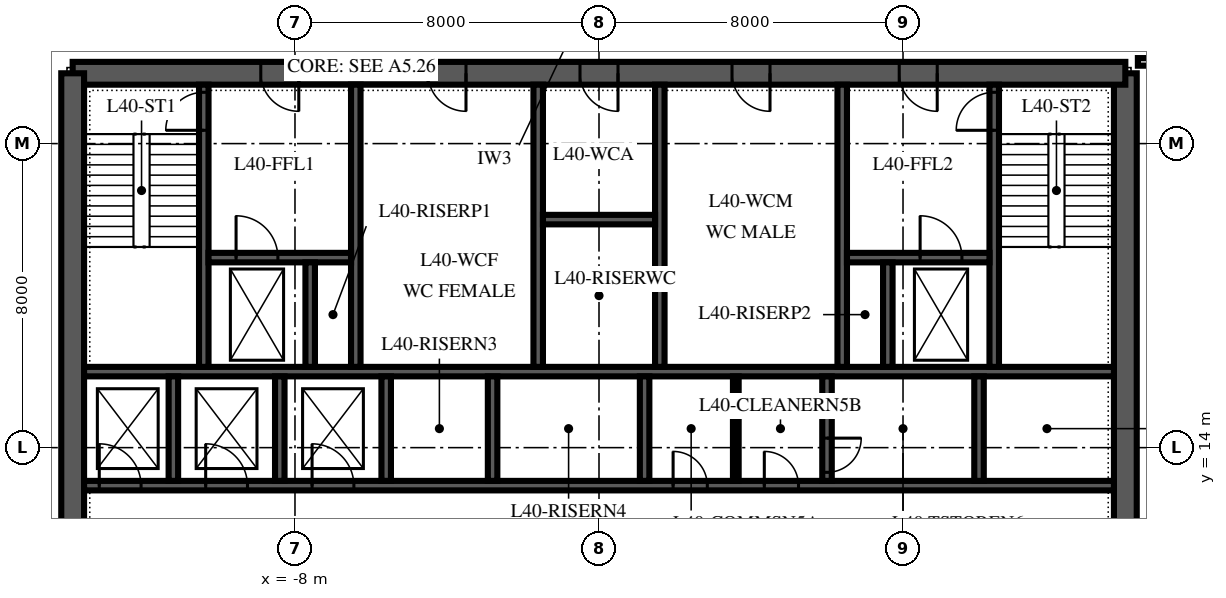
"""IFC4 building model, lengths in metres.
Left out: names, types, materials, properties, quantities, classifications, styles, units other than length and angle.
Written with IfcOpenShell. Run it as: python <this file> out.ifc"""

import sys

from ifc_helpers import new_model, si_unit, direction, frame, frame_2d, origin, place, context, subcontext, project, spatial, polyline, rectangle, outline, extrude, element, fill, save


model = new_model("IFC4")
c1 = context("Model", 3, precision=1e-05, world=origin(), true_north=direction((0.0, 1.0)))
c2 = subcontext(c1, "Body", "Model", "MODEL_VIEW")
j1 = project(units=[si_unit("LENGTHUNIT", "METRE"), si_unit("PLANEANGLEUNIT", "RADIAN")], contexts=[c1])
p1 = place(None, origin())
s1 = spatial("IfcSite", under=j1, at=p1, CompositionType="ELEMENT")
p2 = place(p1, origin())
s2 = spatial("IfcBuilding", under=s1, at=p2, CompositionType="ELEMENT")
p3 = place(p2, frame((0.0, 0.0, 178.0)))
s3 = spatial("IfcBuildingStorey", under=s2, at=p3, CompositionType="ELEMENT", Elevation=178.0)
p4 = place(p3, frame((13.85, 6.15, 0.0), z_axis=(0.0, 0.0, 1.0), x_axis=(0.0, 1.0, 0.0)))
e1 = element("IfcWall", 1, at=p4, inside=s3, PredefinedType="SHEAR", context=c2, shape_type="SweptSolid", body=[
    extrude(outline(polyline([(0.0, -0.3), (17.7, -0.3), (17.7, 0.0), (17.4, 0.0), (17.4, 0.3), (0.3, 0.3), (0.3, 0.0), (0.0, 0.0), (0.0, -0.3)])), origin(), (0.0, 0.0, 1.0), 4.0),
])
p5 = place(p4, frame((4.15, 0.0, 0.0)))
e2 = element("IfcOpeningElement", 2, at=p5, cuts=e1, PredefinedType="OPENING", context=c2, shape_type="SweptSolid", body=[
    extrude(rectangle(XDim=1.8, YDim=2.4, at=frame_2d((0.9, 1.2))), frame((0.0, 0.315, 0.0), z_axis=(0.0, -1.0, 0.0), x_axis=(1.0, 0.0, 0.0)), (0.0, 0.0, 1.0), 0.63),
])
p6 = place(p3, frame((13.85, 23.85, 0.0), z_axis=(0.0, 0.0, 1.0), x_axis=(-1.0, 0.0, 0.0)))
e3 = element("IfcWall", 3, at=p6, inside=s3, PredefinedType="SHEAR", context=c2, shape_type="SweptSolid", body=[
    extrude(rectangle(XDim=27.7, YDim=0.6, at=frame_2d((13.85, 0.0))), origin(), (0.0, 0.0, 1.0), 4.0),
])
p7 = place(p6, frame((21.75, 0.0, 0.0)))
e4 = element("IfcOpeningElement", 4, at=p7, cuts=e3, PredefinedType="OPENING", context=c2, shape_type="SweptSolid", body=[
    extrude(rectangle(XDim=1.0, YDim=2.1, at=frame_2d((0.5, 1.05))), frame((0.0, 0.315, 0.0), z_axis=(0.0, -1.0, 0.0), x_axis=(1.0, 0.0, 0.0)), (0.0, 0.0, 1.0), 0.63),
])
p8 = place(p6, frame((4.95, 0.0, 0.0)))
e5 = element("IfcOpeningElement", 5, at=p8, cuts=e3, PredefinedType="OPENING", context=c2, shape_type="SweptSolid", body=[
    extrude(rectangle(XDim=1.0, YDim=2.1, at=frame_2d((0.5, 1.05))), frame((0.0, 0.315, 0.0), z_axis=(0.0, -1.0, 0.0), x_axis=(1.0, 0.0, 0.0)), (0.0, 0.0, 1.0), 0.63),
])
p9 = place(p6, frame((17.35, 0.0, 0.0)))
e6 = element("IfcOpeningElement", 6, at=p9, cuts=e3, PredefinedType="OPENING", context=c2, shape_type="SweptSolid", body=[
    extrude(rectangle(XDim=1.0, YDim=2.1, at=frame_2d((0.5, 1.05))), frame((0.0, 0.315, 0.0), z_axis=(0.0, -1.0, 0.0), x_axis=(1.0, 0.0, 0.0)), (0.0, 0.0, 1.0), 0.63),
])
p10 = place(p6, frame((13.35, 0.0, 0.0)))
e7 = element("IfcOpeningElement", 7, at=p10, cuts=e3, PredefinedType="OPENING", context=c2, shape_type="SweptSolid", body=[
    extrude(rectangle(XDim=1.0, YDim=2.1, at=frame_2d((0.5, 1.05))), frame((0.0, 0.315, 0.0), z_axis=(0.0, -1.0, 0.0), x_axis=(1.0, 0.0, 0.0)), (0.0, 0.0, 1.0), 0.63),
])
p11 = place(p6, frame((9.35, 0.0, 0.0)))
e8 = element("IfcOpeningElement", 8, at=p11, cuts=e3, PredefinedType="OPENING", context=c2, shape_type="SweptSolid", body=[
    extrude(rectangle(XDim=1.0, YDim=2.1, at=frame_2d((0.5, 1.05))), frame((0.0, 0.315, 0.0), z_axis=(0.0, -1.0, 0.0), x_axis=(1.0, 0.0, 0.0)), (0.0, 0.0, 1.0), 0.63),
])
p12 = place(p3, frame((-13.85, 23.85, 0.0), z_axis=(0.0, 0.0, 1.0), x_axis=(0.0, -1.0, 0.0)))
e9 = element("IfcWall", 9, at=p12, inside=s3, PredefinedType="SHEAR", context=c2, shape_type="SweptSolid", body=[
    extrude(outline(polyline([(0.0, -0.3), (17.7, -0.3), (17.7, 0.0), (17.4, 0.0), (17.4, 0.3), (0.3, 0.3), (0.3, 0.0), (0.0, 0.0), (0.0, -0.3)])), origin(), (0.0, 0.0, 1.0), 4.0),
])
p13 = place(p12, frame((11.75, 0.0, 0.0)))
e10 = element("IfcOpeningElement", 10, at=p13, cuts=e9, PredefinedType="OPENING", context=c2, shape_type="SweptSolid", body=[
    extrude(rectangle(XDim=1.8, YDim=2.4, at=frame_2d((0.9, 1.2))), frame((0.0, 0.315, 0.0), z_axis=(0.0, -1.0, 0.0), x_axis=(1.0, 0.0, 0.0)), (0.0, 0.0, 1.0), 0.63),
])
p14 = place(p3, frame((-13.55, 13.0, 0.0), z_axis=(0.0, 0.0, 1.0), x_axis=(1.0, 0.0, 0.0)))
e11 = element("IfcWall", 11, at=p14, inside=s3, PredefinedType="SHEAR", context=c2, shape_type="SweptSolid", body=[
    extrude(rectangle(XDim=27.1, YDim=0.25, at=frame_2d((13.55, 0.0))), origin(), (0.0, 0.0, 1.0), 4.0),
])
p15 = place(p14, frame((0.4, 0.0, 0.0)))
e12 = element("IfcOpeningElement", 12, at=p15, cuts=e11, PredefinedType="OPENING", context=c2, shape_type="SweptSolid", body=[
    extrude(rectangle(XDim=1.1, YDim=2.1, at=frame_2d((0.55, 1.05))), frame((0.0, 0.14, 0.0), z_axis=(0.0, -1.0, 0.0), x_axis=(1.0, 0.0, 0.0)), (0.0, 0.0, 1.0), 0.28),
])
p16 = place(p14, frame((3.2, 0.0, 0.0)))
e13 = element("IfcOpeningElement", 13, at=p16, cuts=e11, PredefinedType="OPENING", context=c2, shape_type="SweptSolid", body=[
    extrude(rectangle(XDim=1.1, YDim=2.1, at=frame_2d((0.55, 1.05))), frame((0.0, 0.14, 0.0), z_axis=(0.0, -1.0, 0.0), x_axis=(1.0, 0.0, 0.0)), (0.0, 0.0, 1.0), 0.28),
])
p17 = place(p14, frame((6.0, 0.0, 0.0)))
e14 = element("IfcOpeningElement", 14, at=p17, cuts=e11, PredefinedType="OPENING", context=c2, shape_type="SweptSolid", body=[
    extrude(rectangle(XDim=1.1, YDim=2.1, at=frame_2d((0.55, 1.05))), frame((0.0, 0.14, 0.0), z_axis=(0.0, -1.0, 0.0), x_axis=(1.0, 0.0, 0.0)), (0.0, 0.0, 1.0), 0.28),
])
p18 = place(p14, frame((15.5, 0.0, 0.0)))
e15 = element("IfcOpeningElement", 15, at=p18, cuts=e11, PredefinedType="OPENING", context=c2, shape_type="SweptSolid", body=[
    extrude(rectangle(XDim=0.9, YDim=2.1, at=frame_2d((0.45, 1.05))), frame((0.0, 0.14, 0.0), z_axis=(0.0, -1.0, 0.0), x_axis=(1.0, 0.0, 0.0)), (0.0, 0.0, 1.0), 0.28),
])
p19 = place(p14, frame((17.9, 0.0, 0.0)))
e16 = element("IfcOpeningElement", 16, at=p19, cuts=e11, PredefinedType="OPENING", context=c2, shape_type="SweptSolid", body=[
    extrude(rectangle(XDim=0.9, YDim=2.1, at=frame_2d((0.45, 1.05))), frame((0.0, 0.14, 0.0), z_axis=(0.0, -1.0, 0.0), x_axis=(1.0, 0.0, 0.0)), (0.0, 0.0, 1.0), 0.28),
])
p20 = place(p3, frame((-13.55, 16.0, 0.0), z_axis=(0.0, 0.0, 1.0), x_axis=(1.0, 0.0, 0.0)))
e17 = element("IfcWall", 17, at=p20, inside=s3, PredefinedType="SHEAR", context=c2, shape_type="SweptSolid", body=[
    extrude(rectangle(XDim=27.1, YDim=0.25, at=frame_2d((13.55, 0.0))), origin(), (0.0, 0.0, 1.0), 4.0),
])
for number, where, z_axis, x_axis in (
    (18, (-11.2, 13.125, 0.0), (0.0, 0.0, 1.0), (0.0, 1.0, 0.0)),
    (19, (-8.4, 13.125, 0.0), (0.0, 0.0, 1.0), (0.0, 1.0, 0.0)),
    (20, (-5.6, 13.125, 0.0), (0.0, 0.0, 1.0), (0.0, 1.0, 0.0)),
    (21, (-2.8, 13.125, 0.0), (0.0, 0.0, 1.0), (0.0, 1.0, 0.0)),
    (22, (1.2, 13.125, 0.0), (0.0, 0.0, 1.0), (0.0, 1.0, 0.0)),
):
    element("IfcWall", number, at=place(p3, frame(where, z_axis=z_axis, x_axis=x_axis)), inside=s3, PredefinedType="SHEAR", context=c2, shape_type="SweptSolid", body=[
        extrude(rectangle(XDim=2.75, YDim=0.25, at=frame_2d((1.375, 0.0))), origin(), (0.0, 0.0, 1.0), 4.0),
    ])
p21 = place(p3, frame((6.0, 13.125, 0.0), z_axis=(0.0, 0.0, 1.0), x_axis=(0.0, 1.0, 0.0)))
e23 = element("IfcWall", 23, at=p21, inside=s3, PredefinedType="SHEAR", context=c2, shape_type="SweptSolid", body=[
    extrude(rectangle(XDim=2.75, YDim=0.25, at=frame_2d((1.375, 0.0))), origin(), (0.0, 0.0, 1.0), 4.0),
])
p22 = place(p21, frame((0.225, 0.0, 0.0)))
e24 = element("IfcOpeningElement", 24, at=p22, cuts=e23, PredefinedType="OPENING", context=c2, shape_type="SweptSolid", body=[
    extrude(rectangle(XDim=0.9, YDim=2.1, at=frame_2d((0.45, 1.05))), frame((0.0, 0.14, 0.0), z_axis=(0.0, -1.0, 0.0), x_axis=(1.0, 0.0, 0.0)), (0.0, 0.0, 1.0), 0.28),
])
p23 = place(p3, frame((10.0, 13.125, 0.0), z_axis=(0.0, 0.0, 1.0), x_axis=(0.0, 1.0, 0.0)))
e25 = element("IfcWall", 25, at=p23, inside=s3, PredefinedType="SHEAR", context=c2, shape_type="SweptSolid", body=[
    extrude(rectangle(XDim=2.75, YDim=0.25, at=frame_2d((1.375, 0.0))), origin(), (0.0, 0.0, 1.0), 4.0),
])
p24 = place(p3, frame((-10.4, 16.125, 0.0), z_axis=(0.0, 0.0, 1.0), x_axis=(0.0, 1.0, 0.0)))
e26 = element("IfcWall", 26, at=p24, inside=s3, PredefinedType="SHEAR", context=c2, shape_type="SweptSolid", body=[
    extrude(rectangle(XDim=7.425, YDim=0.25, at=frame_2d((3.712, 0.0))), origin(), (0.0, 0.0, 1.0), 4.0),
])
p25 = place(p24, frame((6.225, 0.0, 0.0)))
e27 = element("IfcOpeningElement", 27, at=p25, cuts=e26, PredefinedType="OPENING", context=c2, shape_type="SweptSolid", body=[
    extrude(rectangle(XDim=1.0, YDim=2.1, at=frame_2d((0.5, 1.05))), frame((0.0, 0.14, 0.0), z_axis=(0.0, -1.0, 0.0), x_axis=(1.0, 0.0, 0.0)), (0.0, 0.0, 1.0), 0.28),
])
for number, where, z_axis, x_axis in (
    (28, (-6.4, 16.125, 0.0), (0.0, 0.0, 1.0), (0.0, 1.0, 0.0)),
    (29, (-1.6, 16.125, 0.0), (0.0, 0.0, 1.0), (0.0, 1.0, 0.0)),
    (30, (1.6, 16.125, 0.0), (0.0, 0.0, 1.0), (0.0, 1.0, 0.0)),
    (31, (6.4, 16.125, 0.0), (0.0, 0.0, 1.0), (0.0, 1.0, 0.0)),
):
    element("IfcWall", number, at=place(p3, frame(where, z_axis=z_axis, x_axis=x_axis)), inside=s3, PredefinedType="SHEAR", context=c2, shape_type="SweptSolid", body=[
        extrude(rectangle(XDim=7.425, YDim=0.25, at=frame_2d((3.712, 0.0))), origin(), (0.0, 0.0, 1.0), 4.0),
    ])
p26 = place(p3, frame((10.4, 16.125, 0.0), z_axis=(0.0, 0.0, 1.0), x_axis=(0.0, 1.0, 0.0)))
e32 = element("IfcWall", 32, at=p26, inside=s3, PredefinedType="SHEAR", context=c2, shape_type="SweptSolid", body=[
    extrude(rectangle(XDim=7.425, YDim=0.25, at=frame_2d((3.712, 0.0))), origin(), (0.0, 0.0, 1.0), 4.0),
])
p27 = place(p26, frame((6.225, 0.0, 0.0)))
e33 = element("IfcOpeningElement", 33, at=p27, cuts=e32, PredefinedType="OPENING", context=c2, shape_type="SweptSolid", body=[
    extrude(rectangle(XDim=1.0, YDim=2.1, at=frame_2d((0.5, 1.05))), frame((0.0, 0.14, 0.0), z_axis=(0.0, -1.0, 0.0), x_axis=(1.0, 0.0, 0.0)), (0.0, 0.0, 1.0), 0.28),
])
p28 = place(p3, frame((-10.275, 19.0, 0.0), z_axis=(0.0, 0.0, 1.0), x_axis=(1.0, 0.0, 0.0)))
e34 = element("IfcWall", 34, at=p28, inside=s3, PredefinedType="SHEAR", context=c2, shape_type="SweptSolid", body=[
    extrude(rectangle(XDim=3.75, YDim=0.25, at=frame_2d((1.875, 0.0))), origin(), (0.0, 0.0, 1.0), 4.0),
])
p29 = place(p28, frame((0.725, 0.0, 0.0)))
e35 = element("IfcOpeningElement", 35, at=p29, cuts=e34, PredefinedType="OPENING", context=c2, shape_type="SweptSolid", body=[
    extrude(rectangle(XDim=1.1, YDim=2.1, at=frame_2d((0.55, 1.05))), frame((0.0, 0.14, 0.0), z_axis=(0.0, -1.0, 0.0), x_axis=(1.0, 0.0, 0.0)), (0.0, 0.0, 1.0), 0.28),
])
p30 = place(p3, frame((6.525, 19.0, 0.0), z_axis=(0.0, 0.0, 1.0), x_axis=(1.0, 0.0, 0.0)))
e36 = element("IfcWall", 36, at=p30, inside=s3, PredefinedType="SHEAR", context=c2, shape_type="SweptSolid", body=[
    extrude(rectangle(XDim=3.75, YDim=0.25, at=frame_2d((1.875, 0.0))), origin(), (0.0, 0.0, 1.0), 4.0),
])
p31 = place(p30, frame((1.925, 0.0, 0.0)))
e37 = element("IfcOpeningElement", 37, at=p31, cuts=e36, PredefinedType="OPENING", context=c2, shape_type="SweptSolid", body=[
    extrude(rectangle(XDim=1.1, YDim=2.1, at=frame_2d((0.55, 1.05))), frame((0.0, 0.14, 0.0), z_axis=(0.0, -1.0, 0.0), x_axis=(1.0, 0.0, 0.0)), (0.0, 0.0, 1.0), 0.28),
])
for number, where, z_axis, x_axis in (
    (38, (-7.6, 16.125, 0.0), (0.0, 0.0, 1.0), (0.0, 1.0, 0.0)),
    (39, (7.6, 16.125, 0.0), (0.0, 0.0, 1.0), (0.0, 1.0, 0.0)),
):
    element("IfcWall", number, at=place(p3, frame(where, z_axis=z_axis, x_axis=x_axis)), inside=s3, PredefinedType="SHEAR", context=c2, shape_type="SweptSolid", body=[
        extrude(rectangle(XDim=2.75, YDim=0.25, at=frame_2d((1.375, 0.0))), origin(), (0.0, 0.0, 1.0), 4.0),
    ])
p32 = place(p3, frame((-1.475, 20.0, 0.0), z_axis=(0.0, 0.0, 1.0), x_axis=(1.0, 0.0, 0.0)))
e40 = element("IfcWall", 40, at=p32, inside=s3, PredefinedType="SHEAR", context=c2, shape_type="SweptSolid", body=[
    extrude(rectangle(XDim=2.95, YDim=0.25, at=frame_2d((1.475, 0.0))), origin(), (0.0, 0.0, 1.0), 4.0),
])
p33 = place(p3, frame((3.6, 13.125, 0.0), z_axis=(0.0, 0.0, 1.0), x_axis=(0.0, 1.0, 0.0)))
e41 = element("IfcWall", 41, at=p33, inside=s3, PredefinedType="PARTITIONING", context=c2, shape_type="SweptSolid", body=[
    extrude(rectangle(XDim=2.75, YDim=0.15, at=frame_2d((1.375, 0.0))), origin(), (0.0, 0.0, 1.0), 3.85),
])
p34 = place(p3, frame((14.18, 24.15, 0.0), z_axis=(0.0, 0.0, 1.0), x_axis=(1.0, 0.0, 0.0)))
e42 = element("IfcWall", 42, at=p34, inside=s3, PredefinedType="PARTITIONING", context=c2, shape_type="SweptSolid", body=[
    extrude(rectangle(XDim=1.92, YDim=0.2, at=frame_2d((0.96, 0.0))), origin(), (0.0, 0.0, 1.0), 3.4),
])
p35 = place(p7, origin())
e43 = element("IfcDoor", 43, at=p35, inside=s3, OperationType="SINGLE_SWING_RIGHT", PredefinedType="DOOR", context=c2, shape_type="SweptSolid", body=[
    extrude(rectangle(XDim=1.0, YDim=2.1, at=frame_2d((0.5, 1.05))), frame((0.0, 0.3, 0.0), z_axis=(0.0, -1.0, 0.0), x_axis=(1.0, 0.0, 0.0)), (0.0, 0.0, 1.0), 0.6),
])
fill(e4, e43)
p36 = place(p8, origin())
e44 = element("IfcDoor", 44, at=p36, inside=s3, OperationType="SINGLE_SWING_RIGHT", PredefinedType="DOOR", context=c2, shape_type="SweptSolid", body=[
    extrude(rectangle(XDim=1.0, YDim=2.1, at=frame_2d((0.5, 1.05))), frame((0.0, 0.3, 0.0), z_axis=(0.0, -1.0, 0.0), x_axis=(1.0, 0.0, 0.0)), (0.0, 0.0, 1.0), 0.6),
])
fill(e5, e44)
p37 = place(p9, origin())
e45 = element("IfcDoor", 45, at=p37, inside=s3, OperationType="SINGLE_SWING_LEFT", PredefinedType="DOOR", context=c2, shape_type="SweptSolid", body=[
    extrude(rectangle(XDim=1.0, YDim=2.1, at=frame_2d((0.5, 1.05))), frame((0.0, 0.3, 0.0), z_axis=(0.0, -1.0, 0.0), x_axis=(1.0, 0.0, 0.0)), (0.0, 0.0, 1.0), 0.6),
])
fill(e6, e45)
p38 = place(p10, origin())
e46 = element("IfcDoor", 46, at=p38, inside=s3, OperationType="SINGLE_SWING_LEFT", PredefinedType="DOOR", context=c2, shape_type="SweptSolid", body=[
    extrude(rectangle(XDim=1.0, YDim=2.1, at=frame_2d((0.5, 1.05))), frame((0.0, 0.3, 0.0), z_axis=(0.0, -1.0, 0.0), x_axis=(1.0, 0.0, 0.0)), (0.0, 0.0, 1.0), 0.6),
])
fill(e7, e46)
p39 = place(p11, origin())
e47 = element("IfcDoor", 47, at=p39, inside=s3, OperationType="SINGLE_SWING_LEFT", PredefinedType="DOOR", context=c2, shape_type="SweptSolid", body=[
    extrude(rectangle(XDim=1.0, YDim=2.1, at=frame_2d((0.5, 1.05))), frame((0.0, 0.3, 0.0), z_axis=(0.0, -1.0, 0.0), x_axis=(1.0, 0.0, 0.0)), (0.0, 0.0, 1.0), 0.6),
])
fill(e8, e47)
p40 = place(p25, origin())
e48 = element("IfcDoor", 48, at=p40, inside=s3, OperationType="SINGLE_SWING_LEFT", PredefinedType="DOOR", context=c2, shape_type="SweptSolid", body=[
    extrude(rectangle(XDim=1.0, YDim=2.1, at=frame_2d((0.5, 1.05))), frame((0.0, 0.125, 0.0), z_axis=(0.0, -1.0, 0.0), x_axis=(1.0, 0.0, 0.0)), (0.0, 0.0, 1.0), 0.25),
])
fill(e27, e48)
p41 = place(p27, origin())
e49 = element("IfcDoor", 49, at=p41, inside=s3, OperationType="SINGLE_SWING_LEFT", PredefinedType="DOOR", context=c2, shape_type="SweptSolid", body=[
    extrude(rectangle(XDim=1.0, YDim=2.1, at=frame_2d((0.5, 1.05))), frame((0.0, 0.125, 0.0), z_axis=(0.0, -1.0, 0.0), x_axis=(1.0, 0.0, 0.0)), (0.0, 0.0, 1.0), 0.25),
])
fill(e33, e49)
p42 = place(p15, origin())
e50 = element("IfcDoor", 50, at=p42, inside=s3, OperationType="SLIDING_TO_LEFT", PredefinedType="DOOR", context=c2, shape_type="SweptSolid", body=[
    extrude(rectangle(XDim=1.1, YDim=2.1, at=frame_2d((0.55, 1.05))), frame((0.0, 0.125, 0.0), z_axis=(0.0, -1.0, 0.0), x_axis=(1.0, 0.0, 0.0)), (0.0, 0.0, 1.0), 0.25),
])
fill(e12, e50)
p43 = place(p16, origin())
e51 = element("IfcDoor", 51, at=p43, inside=s3, OperationType="SLIDING_TO_LEFT", PredefinedType="DOOR", context=c2, shape_type="SweptSolid", body=[
    extrude(rectangle(XDim=1.1, YDim=2.1, at=frame_2d((0.55, 1.05))), frame((0.0, 0.125, 0.0), z_axis=(0.0, -1.0, 0.0), x_axis=(1.0, 0.0, 0.0)), (0.0, 0.0, 1.0), 0.25),
])
fill(e13, e51)
p44 = place(p17, origin())
e52 = element("IfcDoor", 52, at=p44, inside=s3, OperationType="SLIDING_TO_LEFT", PredefinedType="DOOR", context=c2, shape_type="SweptSolid", body=[
    extrude(rectangle(XDim=1.1, YDim=2.1, at=frame_2d((0.55, 1.05))), frame((0.0, 0.125, 0.0), z_axis=(0.0, -1.0, 0.0), x_axis=(1.0, 0.0, 0.0)), (0.0, 0.0, 1.0), 0.25),
])
fill(e14, e52)
p45 = place(p31, origin())
e53 = element("IfcDoor", 53, at=p45, inside=s3, OperationType="SLIDING_TO_RIGHT", PredefinedType="DOOR", context=c2, shape_type="SweptSolid", body=[
    extrude(rectangle(XDim=1.1, YDim=2.1, at=frame_2d((0.55, 1.05))), frame((0.0, 0.125, 0.0), z_axis=(0.0, -1.0, 0.0), x_axis=(1.0, 0.0, 0.0)), (0.0, 0.0, 1.0), 0.25),
])
fill(e37, e53)
p46 = place(p29, origin())
e54 = element("IfcDoor", 54, at=p46, inside=s3, OperationType="SLIDING_TO_RIGHT", PredefinedType="DOOR", context=c2, shape_type="SweptSolid", body=[
    extrude(rectangle(XDim=1.1, YDim=2.1, at=frame_2d((0.55, 1.05))), frame((0.0, 0.125, 0.0), z_axis=(0.0, -1.0, 0.0), x_axis=(1.0, 0.0, 0.0)), (0.0, 0.0, 1.0), 0.25),
])
fill(e35, e54)
p47 = place(p18, origin())
e55 = element("IfcDoor", 55, at=p47, inside=s3, OperationType="SINGLE_SWING_LEFT", PredefinedType="DOOR", context=c2, shape_type="SweptSolid", body=[
    extrude(rectangle(XDim=0.9, YDim=2.1, at=frame_2d((0.45, 1.05))), frame((0.0, 0.125, 0.0), z_axis=(0.0, -1.0, 0.0), x_axis=(1.0, 0.0, 0.0)), (0.0, 0.0, 1.0), 0.25),
])
fill(e15, e55)
p48 = place(p19, origin())
e56 = element("IfcDoor", 56, at=p48, inside=s3, OperationType="SINGLE_SWING_LEFT", PredefinedType="DOOR", context=c2, shape_type="SweptSolid", body=[
    extrude(rectangle(XDim=0.9, YDim=2.1, at=frame_2d((0.45, 1.05))), frame((0.0, 0.125, 0.0), z_axis=(0.0, -1.0, 0.0), x_axis=(1.0, 0.0, 0.0)), (0.0, 0.0, 1.0), 0.25),
])
fill(e16, e56)
p49 = place(p22, frame((0.9, 0.0, 0.0), z_axis=(0.0, 0.0, 1.0), x_axis=(-1.0, 0.0, 0.0)))
e57 = element("IfcDoor", 57, at=p49, inside=s3, OperationType="SINGLE_SWING_LEFT", PredefinedType="DOOR", context=c2, shape_type="SweptSolid", body=[
    extrude(rectangle(XDim=0.9, YDim=2.1, at=frame_2d((0.45, 1.05))), frame((0.0, 0.125, 0.0), z_axis=(0.0, -1.0, 0.0), x_axis=(1.0, 0.0, 0.0)), (0.0, 0.0, 1.0), 0.25),
])
fill(e24, e57)
save(model, sys.argv[1])
